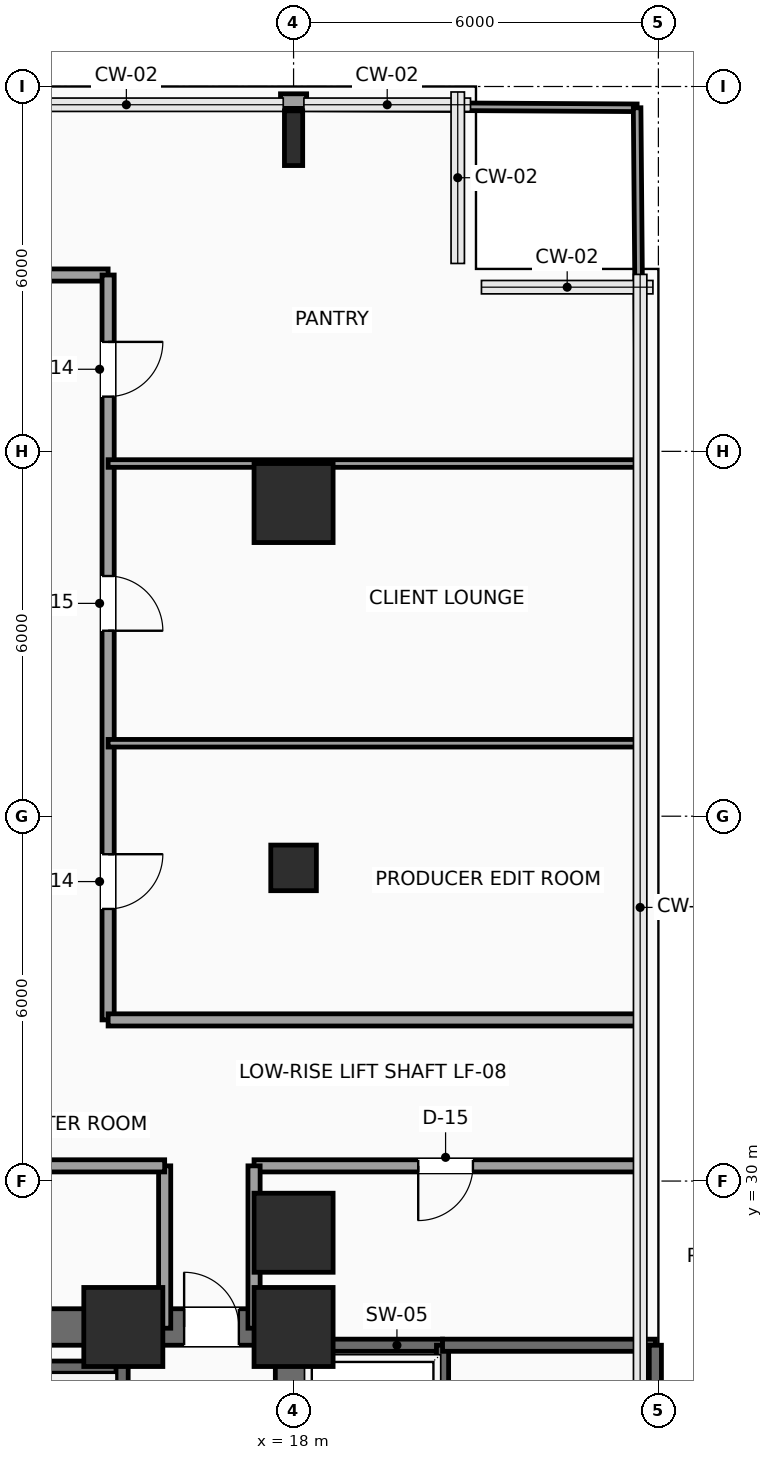
"""IFC4 building model, lengths in metres.
Left out: names, types, materials, properties, quantities, classifications, styles, units other than length and angle.
Written with IfcOpenShell. Run it as: python <this file> out.ifc"""

import sys

from ifc_helpers import new_model, si_unit, direction, frame, frame_2d, origin, origin_2d, place, context, subcontext, project, spatial, rectangle, hollow_rectangle, i_section, extrude, element, fill, save


model = new_model("IFC4")
c1 = context("Model", 3, precision=1e-05, world=origin(), true_north=direction((0.0, 1.0)))
c2 = subcontext(c1, "Body", "Model", "MODEL_VIEW")
j1 = project(units=[si_unit("LENGTHUNIT", "METRE"), si_unit("PLANEANGLEUNIT", "RADIAN")], contexts=[c1])
p1 = place(None, origin())
s1 = spatial("IfcSite", under=j1, at=p1, CompositionType="ELEMENT")
p2 = place(p1, origin())
s2 = spatial("IfcBuilding", under=s1, at=p2, CompositionType="ELEMENT")
p3 = place(p2, frame((0.0, 0.0, 44.1)))
s3 = spatial("IfcBuildingStorey", under=s2, at=p3, CompositionType="ELEMENT", Elevation=44.1)
for number, where, z_axis, x_axis in (
    (1, (15.2, 27.6, 0.0), (0.0, 0.0, 1.0), (1.0, 0.0, 0.0)),
    (2, (18.0, 27.6, 0.0), (0.0, 0.0, 1.0), (1.0, 0.0, 0.0)),
    (3, (18.0, 29.15, 0.0), (0.0, 0.0, 1.0), (1.0, 0.0, 0.0)),
):
    element("IfcColumn", number, at=place(p3, frame(where, z_axis=z_axis, x_axis=x_axis)), inside=s3, PredefinedType="COLUMN", context=c2, shape_type="SweptSolid", body=[
        extrude(rectangle(XDim=1.3, YDim=1.3, at=origin_2d()), origin(), (0.0, 0.0, 1.0), 3.9),
    ])
p4 = place(p3, frame((18.0, 35.15, 0.0), z_axis=(0.0, 0.0, 1.0), x_axis=(1.0, 0.0, 0.0)))
e4 = element("IfcColumn", 4, at=p4, inside=s3, PredefinedType="COLUMN", context=c2, shape_type="SweptSolid", body=[
    extrude(hollow_rectangle(XDim=0.75, YDim=0.75, WallThickness=0.035, InnerFilletRadius=0.035, OuterFilletRadius=0.05, at=origin_2d()), origin(), (0.0, 0.0, 1.0), 3.9),
])
p5 = place(p3, frame((18.0, 41.15, 0.0), z_axis=(0.0, 0.0, 1.0), x_axis=(1.0, 0.0, 0.0)))
e5 = element("IfcColumn", 5, at=p5, inside=s3, PredefinedType="COLUMN", context=c2, shape_type="SweptSolid", body=[
    extrude(rectangle(XDim=1.3, YDim=1.3, at=origin_2d()), origin(), (0.0, 0.0, 1.0), 3.9),
])
p6 = place(p3, frame((18.0, 47.15, 0.0), z_axis=(0.0, 0.0, 1.0), x_axis=(1.0, 0.0, 0.0)))
e6 = element("IfcColumn", 6, at=p6, inside=s3, PredefinedType="COLUMN", context=c2, shape_type="SweptSolid", body=[
    extrude(i_section(OverallWidth=0.3, OverallDepth=0.9, WebThickness=0.019, FlangeThickness=0.035, FilletRadius=0.03, at=origin_2d()), origin(), (0.0, 0.0, 1.0), 3.9),
])
p7 = place(p3, frame((17.785, 47.76, 0.0), z_axis=(0.0, 0.0, 1.0), x_axis=(1.0, 0.0, 0.0)))
e7 = element("IfcWall", 7, at=p7, inside=s3, PredefinedType="SOLIDWALL", context=c2, shape_type="SweptSolid", body=[
    extrude(rectangle(XDim=0.43, YDim=0.24, at=frame_2d((0.215, 0.0))), origin(), (0.0, 0.0, 1.0), 3.65),
])
p8 = place(p3, frame((6.0, 27.6, 0.0), z_axis=(0.0, 0.0, 1.0), x_axis=(1.0, 0.0, 0.0)))
e8 = element("IfcWall", 8, at=p8, inside=s3, PredefinedType="SHEAR", context=c2, shape_type="SweptSolid", body=[
    extrude(rectangle(XDim=12.0, YDim=0.6, at=frame_2d((6.0, 0.0))), origin(), (0.0, 0.0, 1.0), 3.65),
])
p9 = place(p8, frame((10.2, 0.0, 0.0)))
e9 = element("IfcOpeningElement", 9, at=p9, cuts=e8, PredefinedType="OPENING", context=c2, shape_type="SweptSolid", body=[
    extrude(rectangle(XDim=0.9, YDim=2.15, at=frame_2d((0.45, 1.075))), frame((0.0, 0.31, 0.0), z_axis=(0.0, -1.0, 0.0), x_axis=(1.0, 0.0, 0.0)), (0.0, 0.0, 1.0), 0.62),
])
p10 = place(p3, frame((18.0, 18.0, 0.0), z_axis=(0.0, 0.0, 1.0), x_axis=(0.0, 1.0, 0.0)))
e10 = element("IfcWall", 10, at=p10, inside=s3, PredefinedType="SHEAR", context=c2, shape_type="SweptSolid", body=[
    extrude(rectangle(XDim=9.6, YDim=0.6, at=frame_2d((4.8, 0.0))), origin(), (0.0, 0.0, 1.0), 3.65),
])
p11 = place(p3, frame((6.3, 26.94, 0.0), z_axis=(0.0, 0.0, 1.0), x_axis=(1.0, 0.0, 0.0)))
e11 = element("IfcWall", 11, at=p11, inside=s3, PredefinedType="SHEAR", context=c2, shape_type="SweptSolid", body=[
    extrude(rectangle(XDim=8.88, YDim=0.2, at=frame_2d((4.44, 0.0))), origin(), (0.0, 0.0, 1.0), 3.65),
])
p12 = place(p3, frame((15.18, 23.26, 0.0), z_axis=(0.0, 0.0, 1.0), x_axis=(0.0, 1.0, 0.0)))
e12 = element("IfcWall", 12, at=p12, inside=s3, PredefinedType="SHEAR", context=c2, shape_type="SweptSolid", body=[
    extrude(rectangle(XDim=4.04, YDim=0.2, at=frame_2d((2.02, 0.0))), origin(), (0.0, 0.0, 1.0), 3.65),
])
p13 = place(p3, frame((18.1, 27.3, 0.0), z_axis=(0.0, 0.0, 1.0), x_axis=(1.0, 0.0, 0.0)))
e13 = element("IfcWall", 13, at=p13, inside=s3, PredefinedType="SHEAR", context=c2, shape_type="SweptSolid", body=[
    extrude(rectangle(XDim=2.35, YDim=0.2, at=frame_2d((1.175, 0.0))), origin(), (0.0, 0.0, 1.0), 3.65),
])
p14 = place(p3, frame((20.45, 18.25, 0.0), z_axis=(0.0, 0.0, 1.0), x_axis=(0.0, 1.0, 0.0)))
e14 = element("IfcWall", 14, at=p14, inside=s3, PredefinedType="SHEAR", context=c2, shape_type="SweptSolid", body=[
    extrude(rectangle(XDim=9.05, YDim=0.2, at=frame_2d((4.525, 0.0))), origin(), (0.0, 0.0, 1.0), 3.65),
])
p15 = place(p14, frame((0.4, 0.0, 0.0)))
e15 = element("IfcOpeningElement", 15, at=p15, cuts=e14, PredefinedType="OPENING", context=c2, shape_type="SweptSolid", body=[
    extrude(rectangle(XDim=1.2, YDim=2.2, at=frame_2d((0.6, 1.1))), frame((0.0, 0.11, 0.0), z_axis=(0.0, -1.0, 0.0), x_axis=(1.0, 0.0, 0.0)), (0.0, 0.0, 1.0), 0.22),
])
p16 = place(p14, frame((2.65, 0.0, 0.0)))
e16 = element("IfcOpeningElement", 16, at=p16, cuts=e14, PredefinedType="OPENING", context=c2, shape_type="SweptSolid", body=[
    extrude(rectangle(XDim=1.2, YDim=2.2, at=frame_2d((0.6, 1.1))), frame((0.0, 0.11, 0.0), z_axis=(0.0, -1.0, 0.0), x_axis=(1.0, 0.0, 0.0)), (0.0, 0.0, 1.0), 0.22),
])
p17 = place(p14, frame((4.9, 0.0, 0.0)))
e17 = element("IfcOpeningElement", 17, at=p17, cuts=e14, PredefinedType="OPENING", context=c2, shape_type="SweptSolid", body=[
    extrude(rectangle(XDim=1.2, YDim=2.2, at=frame_2d((0.6, 1.1))), frame((0.0, 0.11, 0.0), z_axis=(0.0, -1.0, 0.0), x_axis=(1.0, 0.0, 0.0)), (0.0, 0.0, 1.0), 0.22),
])
p18 = place(p14, frame((7.15, 0.0, 0.0)))
e18 = element("IfcOpeningElement", 18, at=p18, cuts=e14, PredefinedType="OPENING", context=c2, shape_type="SweptSolid", body=[
    extrude(rectangle(XDim=1.2, YDim=2.2, at=frame_2d((0.6, 1.1))), frame((0.0, 0.11, 0.0), z_axis=(0.0, -1.0, 0.0), x_axis=(1.0, 0.0, 0.0)), (0.0, 0.0, 1.0), 0.22),
])
p19 = place(p3, frame((20.45, 27.3, 0.0), z_axis=(0.0, 0.0, 1.0), x_axis=(1.0, 0.0, 0.0)))
e19 = element("IfcWall", 19, at=p19, inside=s3, PredefinedType="SHEAR", context=c2, shape_type="SweptSolid", body=[
    extrude(rectangle(XDim=3.5, YDim=0.2, at=frame_2d((1.75, 0.0))), origin(), (0.0, 0.0, 1.0), 3.65),
])
p20 = place(p3, frame((23.95, 18.0, 0.0), z_axis=(0.0, 0.0, 1.0), x_axis=(0.0, 1.0, 0.0)))
e20 = element("IfcWall", 20, at=p20, inside=s3, PredefinedType="SHEAR", context=c2, shape_type="SweptSolid", body=[
    extrude(rectangle(XDim=9.3, YDim=0.2, at=frame_2d((4.65, 0.0))), origin(), (0.0, 0.0, 1.0), 3.65),
])
p21 = place(p3, frame((12.6, 44.9, 0.0), z_axis=(0.0, 0.0, 1.0), x_axis=(1.0, 0.0, 0.0)))
e21 = element("IfcWall", 21, at=p21, inside=s3, PredefinedType="PARTITIONING", context=c2, shape_type="SweptSolid", body=[
    extrude(rectangle(XDim=2.35, YDim=0.2, at=frame_2d((1.175, 0.0))), origin(), (0.0, 0.0, 1.0), 3.65),
])
p22 = place(p3, frame((14.95, 44.9, 0.0), z_axis=(0.0, 0.0, 1.0), x_axis=(0.0, -1.0, 0.0)))
e22 = element("IfcWall", 22, at=p22, inside=s3, PredefinedType="PARTITIONING", context=c2, shape_type="SweptSolid", body=[
    extrude(rectangle(XDim=12.25, YDim=0.2, at=frame_2d((6.125, 0.0))), origin(), (0.0, 0.0, 1.0), 3.65),
])
p23 = place(p22, frame((9.525, 0.0, 0.0)))
e23 = element("IfcOpeningElement", 23, at=p23, cuts=e22, PredefinedType="OPENING", context=c2, shape_type="SweptSolid", body=[
    extrude(rectangle(XDim=0.9, YDim=2.1, at=frame_2d((0.45, 1.05))), frame((0.0, 0.11, 0.0), z_axis=(0.0, -1.0, 0.0), x_axis=(1.0, 0.0, 0.0)), (0.0, 0.0, 1.0), 0.22),
])
p24 = place(p22, frame((4.95, 0.0, 0.0)))
e24 = element("IfcOpeningElement", 24, at=p24, cuts=e22, PredefinedType="OPENING", context=c2, shape_type="SweptSolid", body=[
    extrude(rectangle(XDim=0.9, YDim=2.1, at=frame_2d((0.45, 1.05))), frame((0.0, 0.11, 0.0), z_axis=(0.0, -1.0, 0.0), x_axis=(1.0, 0.0, 0.0)), (0.0, 0.0, 1.0), 0.22),
])
p25 = place(p22, frame((1.1, 0.0, 0.0)))
e25 = element("IfcOpeningElement", 25, at=p25, cuts=e22, PredefinedType="OPENING", context=c2, shape_type="SweptSolid", body=[
    extrude(rectangle(XDim=0.9, YDim=2.1, at=frame_2d((0.45, 1.05))), frame((0.0, 0.11, 0.0), z_axis=(0.0, -1.0, 0.0), x_axis=(1.0, 0.0, 0.0)), (0.0, 0.0, 1.0), 0.22),
])
p26 = place(p3, frame((14.95, 32.65, 0.0), z_axis=(0.0, 0.0, 1.0), x_axis=(1.0, 0.0, 0.0)))
e26 = element("IfcWall", 26, at=p26, inside=s3, PredefinedType="PARTITIONING", context=c2, shape_type="SweptSolid", body=[
    extrude(rectangle(XDim=8.75, YDim=0.2, at=frame_2d((4.375, 0.0))), origin(), (0.0, 0.0, 1.0), 3.65),
])
p27 = place(p3, frame((23.7, 30.25, 0.0), z_axis=(0.0, 0.0, 1.0), x_axis=(-1.0, 0.0, 0.0)))
e27 = element("IfcWall", 27, at=p27, inside=s3, PredefinedType="PARTITIONING", context=c2, shape_type="SweptSolid", body=[
    extrude(rectangle(XDim=6.35, YDim=0.2, at=frame_2d((3.175, 0.0))), origin(), (0.0, 0.0, 1.0), 3.65),
])
p28 = place(p27, frame((2.75, 0.0, 0.0)))
e28 = element("IfcOpeningElement", 28, at=p28, cuts=e27, PredefinedType="OPENING", context=c2, shape_type="SweptSolid", body=[
    extrude(rectangle(XDim=0.9, YDim=2.1, at=frame_2d((0.45, 1.05))), frame((0.0, 0.11, 0.0), z_axis=(0.0, -1.0, 0.0), x_axis=(1.0, 0.0, 0.0)), (0.0, 0.0, 1.0), 0.22),
])
for number, where, z_axis, x_axis in (
    (29, (17.35, 30.25, 0.0), (0.0, 0.0, 1.0), (0.0, -1.0, 0.0)),
    (30, (15.88, 27.58, 0.0), (0.0, 0.0, 1.0), (0.0, 1.0, 0.0)),
):
    element("IfcWall", number, at=place(p3, frame(where, z_axis=z_axis, x_axis=x_axis)), inside=s3, PredefinedType="PARTITIONING", context=c2, shape_type="SweptSolid", body=[
        extrude(rectangle(XDim=2.67, YDim=0.2, at=frame_2d((1.335, 0.0))), origin(), (0.0, 0.0, 1.0), 3.65),
    ])
p29 = place(p3, frame((15.88, 30.25, 0.0), z_axis=(0.0, 0.0, 1.0), x_axis=(-1.0, 0.0, 0.0)))
e31 = element("IfcWall", 31, at=p29, inside=s3, PredefinedType="PARTITIONING", context=c2, shape_type="SweptSolid", body=[
    extrude(rectangle(XDim=10.63, YDim=0.2, at=frame_2d((5.315, 0.0))), origin(), (0.0, 0.0, 1.0), 3.65),
])
p30 = place(p29, frame((6.13, 0.0, 0.0)))
e32 = element("IfcOpeningElement", 32, at=p30, cuts=e31, PredefinedType="OPENING", context=c2, shape_type="SweptSolid", body=[
    extrude(rectangle(XDim=0.9, YDim=2.1, at=frame_2d((0.45, 1.05))), frame((0.0, 0.11, 0.0), z_axis=(0.0, -1.0, 0.0), x_axis=(1.0, 0.0, 0.0)), (0.0, 0.0, 1.0), 0.22),
])
for number, where, z_axis, x_axis in (
    (33, (14.95, 37.2, 0.0), (0.0, 0.0, 1.0), (1.0, 0.0, 0.0)),
    (34, (14.95, 41.8, 0.0), (0.0, 0.0, 1.0), (1.0, 0.0, 0.0)),
):
    element("IfcWall", number, at=place(p3, frame(where, z_axis=z_axis, x_axis=x_axis)), inside=s3, PredefinedType="PARTITIONING", context=c2, shape_type="SweptSolid", body=[
        extrude(rectangle(XDim=8.75, YDim=0.125, at=frame_2d((4.375, 0.0))), origin(), (0.0, 0.0, 1.0), 3.65),
    ])
p31 = place(p3, frame((14.95, 47.7, 0.0), z_axis=(0.0, 0.0, 1.0), x_axis=(0.999983354582, -0.005769797172, 0.0)))
e35 = element("IfcWall", 35, at=p31, inside=s3, PredefinedType="PARTITIONING", context=c2, shape_type="SweptSolid", body=[
    extrude(rectangle(XDim=2.835, YDim=0.125, at=frame_2d((1.417, 0.0))), origin(), (0.0, 0.0, 1.0), 3.65),
])
p32 = place(p3, frame((18.215, 47.681, 0.0), z_axis=(0.0, 0.0, 1.0), x_axis=(0.999983469354, -0.005749871258, 0.0)))
e36 = element("IfcWall", 36, at=p32, inside=s3, PredefinedType="PARTITIONING", context=c2, shape_type="SweptSolid", body=[
    extrude(rectangle(XDim=5.435, YDim=0.125, at=frame_2d((2.717, 0.0))), origin(), (0.0, 0.0, 1.0), 3.65),
])
p33 = place(p3, frame((23.7, 41.8, 0.0), z_axis=(0.0, 0.0, 1.0), x_axis=(-0.00855525636, 0.999963403125, 0.0)))
e37 = element("IfcWall", 37, at=p33, inside=s3, PredefinedType="PARTITIONING", context=c2, shape_type="SweptSolid", body=[
    extrude(rectangle(XDim=5.85, YDim=0.125, at=frame_2d((2.925, 0.0))), origin(), (0.0, 0.0, 1.0), 3.65),
])
p34 = place(p9, origin())
e38 = element("IfcDoor", 38, at=p34, inside=s3, OperationType="SINGLE_SWING_LEFT", PredefinedType="DOOR", context=c2, shape_type="SweptSolid", body=[
    extrude(rectangle(XDim=0.9, YDim=2.15, at=frame_2d((0.45, 1.075))), frame((0.0, 0.025, 0.0), z_axis=(0.0, -1.0, 0.0), x_axis=(1.0, 0.0, 0.0)), (0.0, 0.0, 1.0), 0.05),
])
fill(e9, e38)
p35 = place(p23, origin())
e39 = element("IfcDoor", 39, at=p35, inside=s3, OperationType="SINGLE_SWING_LEFT", PredefinedType="DOOR", context=c2, shape_type="SweptSolid", body=[
    extrude(rectangle(XDim=0.9, YDim=2.1, at=frame_2d((0.45, 1.05))), frame((0.0, 0.025, 0.0), z_axis=(0.0, -1.0, 0.0), x_axis=(1.0, 0.0, 0.0)), (0.0, 0.0, 1.0), 0.05),
])
fill(e23, e39)
p36 = place(p24, origin())
e40 = element("IfcDoor", 40, at=p36, inside=s3, OperationType="SINGLE_SWING_RIGHT", PredefinedType="DOOR", context=c2, shape_type="SweptSolid", body=[
    extrude(rectangle(XDim=0.9, YDim=2.1, at=frame_2d((0.45, 1.05))), frame((0.0, 0.025, 0.0), z_axis=(0.0, -1.0, 0.0), x_axis=(1.0, 0.0, 0.0)), (0.0, 0.0, 1.0), 0.05),
])
fill(e24, e40)
p37 = place(p25, origin())
e41 = element("IfcDoor", 41, at=p37, inside=s3, OperationType="SINGLE_SWING_LEFT", PredefinedType="DOOR", context=c2, shape_type="SweptSolid", body=[
    extrude(rectangle(XDim=0.9, YDim=2.1, at=frame_2d((0.45, 1.05))), frame((0.0, 0.025, 0.0), z_axis=(0.0, -1.0, 0.0), x_axis=(1.0, 0.0, 0.0)), (0.0, 0.0, 1.0), 0.05),
])
fill(e25, e41)
p38 = place(p28, origin())
e42 = element("IfcDoor", 42, at=p38, inside=s3, OperationType="SINGLE_SWING_RIGHT", PredefinedType="DOOR", context=c2, shape_type="SweptSolid", body=[
    extrude(rectangle(XDim=0.9, YDim=2.1, at=frame_2d((0.45, 1.05))), frame((0.0, 0.025, 0.0), z_axis=(0.0, -1.0, 0.0), x_axis=(1.0, 0.0, 0.0)), (0.0, 0.0, 1.0), 0.05),
])
fill(e28, e42)
save(model, sys.argv[1])
